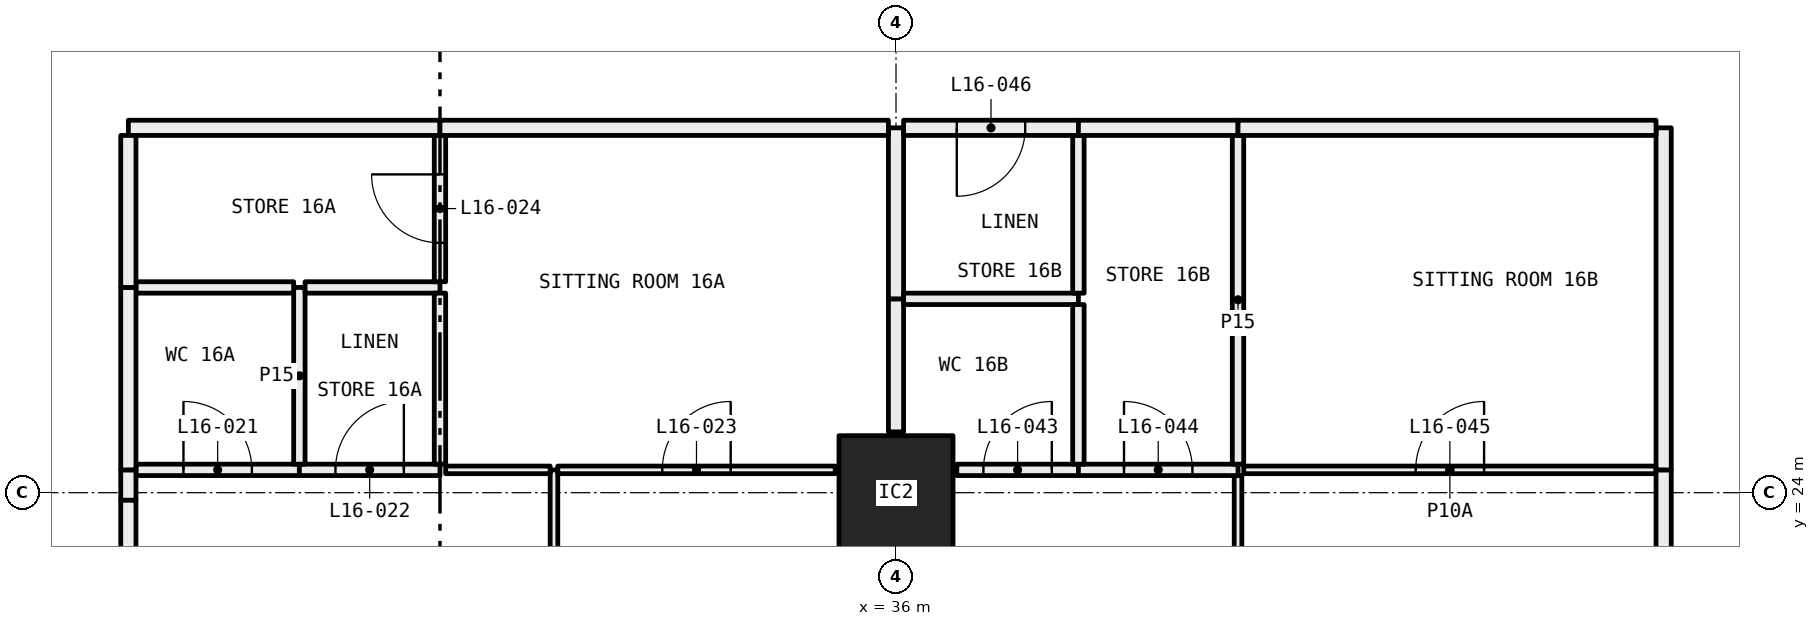
"""IFC4 building model, lengths in metres.
Left out: names, types, materials, properties, quantities, classifications, styles, units other than length and angle.
Written with IfcOpenShell. Run it as: python <this file> out.ifc"""

import sys

from ifc_helpers import new_model, si_unit, direction, frame, frame_2d, origin, origin_2d, place, context, subcontext, project, spatial, rectangle, hollow_rectangle, extrude, element, fill, save


model = new_model("IFC4")
c1 = context("Model", 3, precision=1e-05, world=origin(), true_north=direction((0.0, 1.0)))
c2 = subcontext(c1, "Body", "Model", "MODEL_VIEW")
j1 = project(units=[si_unit("LENGTHUNIT", "METRE"), si_unit("PLANEANGLEUNIT", "RADIAN")], contexts=[c1])
p1 = place(None, origin())
s1 = spatial("IfcSite", under=j1, at=p1, CompositionType="ELEMENT")
p2 = place(p1, origin())
s2 = spatial("IfcBuilding", under=s1, at=p2, CompositionType="ELEMENT")
p3 = place(p2, frame((0.0, 0.0, 67.95)))
s3 = spatial("IfcBuildingStorey", under=s2, at=p3, CompositionType="ELEMENT", Elevation=67.95)
p4 = place(p3, frame((36.0, 24.0, 0.0), z_axis=(0.0, 0.0, 1.0), x_axis=(1.0, 0.0, 0.0)))
e1 = element("IfcColumn", 1, at=p4, inside=s3, PredefinedType="COLUMN", context=c2, shape_type="SweptSolid", body=[
    extrude(hollow_rectangle(XDim=1.5, YDim=1.5, WallThickness=0.065, at=origin_2d()), origin(), (0.0, 0.0, 1.0), 3.05),
])
p5 = place(p3, frame((31.5, 18.05, 0.0), z_axis=(0.0, 0.0, 1.0), x_axis=(0.0, 1.0, 0.0)))
e2 = element("IfcWall", 2, at=p5, inside=s3, PredefinedType="PARTITIONING", context=c2, shape_type="SweptSolid", body=[
    extrude(rectangle(XDim=6.25, YDim=0.1, at=frame_2d((3.125, 0.0))), origin(), (0.0, 0.0, 1.0), 2.45),
])
p6 = place(p5, frame((2.675, 0.0, 0.0)))
e3 = element("IfcOpeningElement", 3, at=p6, cuts=e2, PredefinedType="OPENING", context=c2, shape_type="SweptSolid", body=[
    extrude(rectangle(XDim=0.9, YDim=2.1, at=frame_2d((0.45, 1.05))), frame((0.0, 0.06, 0.0), z_axis=(0.0, -1.0, 0.0), x_axis=(1.0, 0.0, 0.0)), (0.0, 0.0, 1.0), 0.12),
])
p7 = place(p3, frame((28.15, 24.3, 0.0), z_axis=(0.0, 0.0, 1.0), x_axis=(-1.0, 0.0, 0.0)))
e4 = element("IfcWall", 4, at=p7, inside=s3, PredefinedType="PARTITIONING", context=c2, shape_type="SweptSolid", body=[
    extrude(rectangle(XDim=2.15, YDim=0.15, at=frame_2d((1.075, 0.0))), origin(), (0.0, 0.0, 1.0), 3.05),
])
p8 = place(p7, frame((0.625, 0.0, 0.0)))
e5 = element("IfcOpeningElement", 5, at=p8, cuts=e4, PredefinedType="OPENING", context=c2, shape_type="SweptSolid", body=[
    extrude(rectangle(XDim=0.9, YDim=2.1, at=frame_2d((0.45, 1.05))), frame((0.0, 0.085, 0.0), z_axis=(0.0, -1.0, 0.0), x_axis=(1.0, 0.0, 0.0)), (0.0, 0.0, 1.0), 0.17),
])
p9 = place(p3, frame((30.0, 24.3, 0.0), z_axis=(0.0, 0.0, 1.0), x_axis=(-1.0, 0.0, 0.0)))
e6 = element("IfcWall", 6, at=p9, inside=s3, PredefinedType="PARTITIONING", context=c2, shape_type="SweptSolid", body=[
    extrude(rectangle(XDim=1.85, YDim=0.15, at=frame_2d((0.925, 0.0))), origin(), (0.0, 0.0, 1.0), 3.05),
])
p10 = place(p9, frame((0.475, 0.0, 0.0)))
e7 = element("IfcOpeningElement", 7, at=p10, cuts=e6, PredefinedType="OPENING", context=c2, shape_type="SweptSolid", body=[
    extrude(rectangle(XDim=0.9, YDim=2.1, at=frame_2d((0.45, 1.05))), frame((0.0, 0.085, 0.0), z_axis=(0.0, -1.0, 0.0), x_axis=(1.0, 0.0, 0.0)), (0.0, 0.0, 1.0), 0.17),
])
p11 = place(p3, frame((31.45, 24.3, 0.0), z_axis=(0.0, 0.0, 1.0), x_axis=(-1.0, 0.0, 0.0)))
e8 = element("IfcWall", 8, at=p11, inside=s3, PredefinedType="PARTITIONING", context=c2, shape_type="SweptSolid", body=[
    extrude(rectangle(XDim=1.375, YDim=0.1, at=frame_2d((0.688, 0.0))), origin(), (0.0, 0.0, 1.0), 3.05),
])
p12 = place(p3, frame((25.9, 24.3, 0.0), z_axis=(0.0, 0.0, 1.0), x_axis=(0.0, -1.0, 0.0)))
e9 = element("IfcWall", 9, at=p12, inside=s3, PredefinedType="PARTITIONING", context=c2, shape_type="SweptSolid", body=[
    extrude(rectangle(XDim=0.4, YDim=0.2, at=frame_2d((0.2, 0.0))), origin(), (0.0, 0.0, 1.0), 2.45),
])
p13 = place(p3, frame((25.9, 23.9, 0.0), z_axis=(0.0, 0.0, 1.0), x_axis=(0.0, -1.0, 0.0)))
e10 = element("IfcWall", 10, at=p13, inside=s3, PredefinedType="PARTITIONING", context=c2, shape_type="SweptSolid", body=[
    extrude(rectangle(XDim=5.8, YDim=0.2, at=frame_2d((2.9, 0.0))), origin(), (0.0, 0.0, 1.0), 3.05),
])
p14 = place(p3, frame((35.2, 24.3, 0.0), z_axis=(0.0, 0.0, 1.0), x_axis=(-1.0, 0.0, 0.0)))
e11 = element("IfcWall", 11, at=p14, inside=s3, PredefinedType="PARTITIONING", context=c2, shape_type="SweptSolid", body=[
    extrude(rectangle(XDim=3.65, YDim=0.1, at=frame_2d((1.825, 0.0))), origin(), (0.0, 0.0, 1.0), 3.05),
])
p15 = place(p14, frame((1.375, 0.0, 0.0)))
e12 = element("IfcOpeningElement", 12, at=p15, cuts=e11, PredefinedType="OPENING", context=c2, shape_type="SweptSolid", body=[
    extrude(rectangle(XDim=0.9, YDim=2.1, at=frame_2d((0.45, 1.05))), frame((0.0, 0.06, 0.0), z_axis=(0.0, -1.0, 0.0), x_axis=(1.0, 0.0, 0.0)), (0.0, 0.0, 1.0), 0.12),
])
p16 = place(p3, frame((28.15, 24.375, 0.0), z_axis=(0.0, 0.0, 1.0), x_axis=(0.0, 1.0, 0.0)))
e13 = element("IfcWall", 13, at=p16, inside=s3, PredefinedType="PARTITIONING", context=c2, shape_type="SweptSolid", body=[
    extrude(rectangle(XDim=2.325, YDim=0.15, at=frame_2d((1.163, 0.0))), origin(), (0.0, 0.0, 1.0), 3.05),
])
p17 = place(p3, frame((28.075, 26.7, 0.0), z_axis=(0.0, 0.0, 1.0), x_axis=(-1.0, 0.0, 0.0)))
e14 = element("IfcWall", 14, at=p17, inside=s3, PredefinedType="PARTITIONING", context=c2, shape_type="SweptSolid", body=[
    extrude(rectangle(XDim=2.075, YDim=0.15, at=frame_2d((1.038, 0.0))), origin(), (0.0, 0.0, 1.0), 3.05),
])
p18 = place(p3, frame((25.9, 26.7, 0.0), z_axis=(0.0, 0.0, 1.0), x_axis=(0.0, -1.0, 0.0)))
e15 = element("IfcWall", 15, at=p18, inside=s3, PredefinedType="PARTITIONING", context=c2, shape_type="SweptSolid", body=[
    extrude(rectangle(XDim=2.4, YDim=0.2, at=frame_2d((1.2, 0.0))), origin(), (0.0, 0.0, 1.0), 3.05),
])
p19 = place(p3, frame((30.0, 26.7, 0.0), z_axis=(0.0, 0.0, 1.0), x_axis=(-1.0, 0.0, 0.0)))
e16 = element("IfcWall", 16, at=p19, inside=s3, PredefinedType="PARTITIONING", context=c2, shape_type="SweptSolid", body=[
    extrude(rectangle(XDim=1.775, YDim=0.15, at=frame_2d((0.887, 0.0))), origin(), (0.0, 0.0, 1.0), 3.05),
])
p20 = place(p3, frame((30.0, 24.375, 0.0), z_axis=(0.0, 0.0, 1.0), x_axis=(0.0, 1.0, 0.0)))
e17 = element("IfcWall", 17, at=p20, inside=s3, PredefinedType="PARTITIONING", context=c2, shape_type="SweptSolid", body=[
    extrude(rectangle(XDim=2.25, YDim=0.15, at=frame_2d((1.125, 0.0))), origin(), (0.0, 0.0, 1.0), 3.05),
])
p21 = place(p3, frame((30.0, 26.775, 0.0), z_axis=(0.0, 0.0, 1.0), x_axis=(0.0, 1.0, 0.0)))
e18 = element("IfcWall", 18, at=p21, inside=s3, PredefinedType="PARTITIONING", context=c2, shape_type="SweptSolid", body=[
    extrude(rectangle(XDim=1.925, YDim=0.15, at=frame_2d((0.962, 0.0))), origin(), (0.0, 0.0, 1.0), 3.05),
])
p22 = place(p21, frame((0.512, 0.0, 0.0)))
e19 = element("IfcOpeningElement", 19, at=p22, cuts=e18, PredefinedType="OPENING", context=c2, shape_type="SweptSolid", body=[
    extrude(rectangle(XDim=0.9, YDim=2.1, at=frame_2d((0.45, 1.05))), frame((0.0, 0.085, 0.0), z_axis=(0.0, -1.0, 0.0), x_axis=(1.0, 0.0, 0.0)), (0.0, 0.0, 1.0), 0.17),
])
p23 = place(p3, frame((30.0, 28.8, 0.0), z_axis=(0.0, 0.0, 1.0), x_axis=(-1.0, 0.0, 0.0)))
e20 = element("IfcWall", 20, at=p23, inside=s3, PredefinedType="PARTITIONING", context=c2, shape_type="SweptSolid", body=[
    extrude(rectangle(XDim=4.1, YDim=0.2, at=frame_2d((2.05, 0.0))), origin(), (0.0, 0.0, 1.0), 3.05),
])
p24 = place(p3, frame((25.9, 28.7, 0.0), z_axis=(0.0, 0.0, 1.0), x_axis=(0.0, -1.0, 0.0)))
e21 = element("IfcWall", 21, at=p24, inside=s3, PredefinedType="PARTITIONING", context=c2, shape_type="SweptSolid", body=[
    extrude(rectangle(XDim=2.0, YDim=0.2, at=frame_2d((1.0, 0.0))), origin(), (0.0, 0.0, 1.0), 3.05),
])
p25 = place(p3, frame((36.0, 24.8, 0.0), z_axis=(0.0, 0.0, 1.0), x_axis=(0.0, 1.0, 0.0)))
e22 = element("IfcWall", 22, at=p25, inside=s3, PredefinedType="PARTITIONING", context=c2, shape_type="SweptSolid", body=[
    extrude(rectangle(XDim=1.75, YDim=0.2, at=frame_2d((0.875, 0.0))), origin(), (0.0, 0.0, 1.0), 2.45),
])
p26 = place(p3, frame((36.0, 26.55, 0.0), z_axis=(0.0, 0.0, 1.0), x_axis=(0.0, 1.0, 0.0)))
e23 = element("IfcWall", 23, at=p26, inside=s3, PredefinedType="PARTITIONING", context=c2, shape_type="SweptSolid", body=[
    extrude(rectangle(XDim=2.25, YDim=0.2, at=frame_2d((1.125, 0.0))), origin(), (0.0, 0.0, 1.0), 2.45),
])
p27 = place(p3, frame((35.9, 28.8, 0.0), z_axis=(0.0, 0.0, 1.0), x_axis=(-1.0, 0.0, 0.0)))
e24 = element("IfcWall", 24, at=p27, inside=s3, PredefinedType="PARTITIONING", context=c2, shape_type="SweptSolid", body=[
    extrude(rectangle(XDim=5.9, YDim=0.2, at=frame_2d((2.95, 0.0))), origin(), (0.0, 0.0, 1.0), 3.05),
])
p28 = place(p3, frame((40.5, 18.05, 0.0), z_axis=(0.0, 0.0, 1.0), x_axis=(0.0, 1.0, 0.0)))
e25 = element("IfcWall", 25, at=p28, inside=s3, PredefinedType="PARTITIONING", context=c2, shape_type="SweptSolid", body=[
    extrude(rectangle(XDim=6.175, YDim=0.1, at=frame_2d((3.087, 0.0))), origin(), (0.0, 0.0, 1.0), 2.45),
])
p29 = place(p28, frame((2.637, 0.0, 0.0)))
e26 = element("IfcOpeningElement", 26, at=p29, cuts=e25, PredefinedType="OPENING", context=c2, shape_type="SweptSolid", body=[
    extrude(rectangle(XDim=0.9, YDim=2.1, at=frame_2d((0.45, 1.05))), frame((0.0, 0.06, 0.0), z_axis=(0.0, -1.0, 0.0), x_axis=(1.0, 0.0, 0.0)), (0.0, 0.0, 1.0), 0.12),
])
p30 = place(p3, frame((38.4, 24.3, 0.0), z_axis=(0.0, 0.0, 1.0), x_axis=(-1.0, 0.0, 0.0)))
e27 = element("IfcWall", 27, at=p30, inside=s3, PredefinedType="PARTITIONING", context=c2, shape_type="SweptSolid", body=[
    extrude(rectangle(XDim=1.6, YDim=0.15, at=frame_2d((0.8, 0.0))), origin(), (0.0, 0.0, 1.0), 3.05),
])
p31 = place(p30, frame((0.35, 0.0, 0.0)))
e28 = element("IfcOpeningElement", 28, at=p31, cuts=e27, PredefinedType="OPENING", context=c2, shape_type="SweptSolid", body=[
    extrude(rectangle(XDim=0.9, YDim=2.1, at=frame_2d((0.45, 1.05))), frame((0.0, 0.085, 0.0), z_axis=(0.0, -1.0, 0.0), x_axis=(1.0, 0.0, 0.0)), (0.0, 0.0, 1.0), 0.17),
])
p32 = place(p3, frame((40.5, 24.3, 0.0), z_axis=(0.0, 0.0, 1.0), x_axis=(-1.0, 0.0, 0.0)))
e29 = element("IfcWall", 29, at=p32, inside=s3, PredefinedType="PARTITIONING", context=c2, shape_type="SweptSolid", body=[
    extrude(rectangle(XDim=2.1, YDim=0.15, at=frame_2d((1.05, 0.0))), origin(), (0.0, 0.0, 1.0), 3.05),
])
p33 = place(p32, frame((0.6, 0.0, 0.0)))
e30 = element("IfcOpeningElement", 30, at=p33, cuts=e29, PredefinedType="OPENING", context=c2, shape_type="SweptSolid", body=[
    extrude(rectangle(XDim=0.9, YDim=2.1, at=frame_2d((0.45, 1.05))), frame((0.0, 0.085, 0.0), z_axis=(0.0, -1.0, 0.0), x_axis=(1.0, 0.0, 0.0)), (0.0, 0.0, 1.0), 0.17),
])
p34 = place(p3, frame((46.0, 24.3, 0.0), z_axis=(0.0, 0.0, 1.0), x_axis=(-1.0, 0.0, 0.0)))
e31 = element("IfcWall", 31, at=p34, inside=s3, PredefinedType="PARTITIONING", context=c2, shape_type="SweptSolid", body=[
    extrude(rectangle(XDim=5.425, YDim=0.1, at=frame_2d((2.712, 0.0))), origin(), (0.0, 0.0, 1.0), 3.05),
])
p35 = place(p34, frame((2.262, 0.0, 0.0)))
e32 = element("IfcOpeningElement", 32, at=p35, cuts=e31, PredefinedType="OPENING", context=c2, shape_type="SweptSolid", body=[
    extrude(rectangle(XDim=0.9, YDim=2.1, at=frame_2d((0.45, 1.05))), frame((0.0, 0.06, 0.0), z_axis=(0.0, -1.0, 0.0), x_axis=(1.0, 0.0, 0.0)), (0.0, 0.0, 1.0), 0.12),
])
p36 = place(p3, frame((46.1, 18.1, 0.0), z_axis=(0.0, 0.0, 1.0), x_axis=(0.0, 1.0, 0.0)))
e33 = element("IfcWall", 33, at=p36, inside=s3, PredefinedType="PARTITIONING", context=c2, shape_type="SweptSolid", body=[
    extrude(rectangle(XDim=6.2, YDim=0.2, at=frame_2d((3.1, 0.0))), origin(), (0.0, 0.0, 1.0), 2.45),
])
p37 = place(p3, frame((38.4, 26.55, 0.0), z_axis=(0.0, 0.0, 1.0), x_axis=(-1.0, 0.0, 0.0)))
e34 = element("IfcWall", 34, at=p37, inside=s3, PredefinedType="PARTITIONING", context=c2, shape_type="SweptSolid", body=[
    extrude(rectangle(XDim=2.3, YDim=0.15, at=frame_2d((1.15, 0.0))), origin(), (0.0, 0.0, 1.0), 3.05),
])
p38 = place(p3, frame((38.4, 24.375, 0.0), z_axis=(0.0, 0.0, 1.0), x_axis=(0.0, 1.0, 0.0)))
e35 = element("IfcWall", 35, at=p38, inside=s3, PredefinedType="PARTITIONING", context=c2, shape_type="SweptSolid", body=[
    extrude(rectangle(XDim=2.1, YDim=0.15, at=frame_2d((1.05, 0.0))), origin(), (0.0, 0.0, 1.0), 3.05),
])
p39 = place(p3, frame((38.4, 26.625, 0.0), z_axis=(0.0, 0.0, 1.0), x_axis=(0.0, 1.0, 0.0)))
e36 = element("IfcWall", 36, at=p39, inside=s3, PredefinedType="PARTITIONING", context=c2, shape_type="SweptSolid", body=[
    extrude(rectangle(XDim=2.075, YDim=0.15, at=frame_2d((1.038, 0.0))), origin(), (0.0, 0.0, 1.0), 3.05),
])
p40 = place(p3, frame((38.4, 28.8, 0.0), z_axis=(0.0, 0.0, 1.0), x_axis=(-1.0, 0.0, 0.0)))
e37 = element("IfcWall", 37, at=p40, inside=s3, PredefinedType="PARTITIONING", context=c2, shape_type="SweptSolid", body=[
    extrude(rectangle(XDim=2.3, YDim=0.2, at=frame_2d((1.15, 0.0))), origin(), (0.0, 0.0, 1.0), 3.05),
])
p41 = place(p40, frame((0.7, 0.0, 0.0)))
e38 = element("IfcOpeningElement", 38, at=p41, cuts=e37, PredefinedType="OPENING", context=c2, shape_type="SweptSolid", body=[
    extrude(rectangle(XDim=0.9, YDim=2.1, at=frame_2d((0.45, 1.05))), frame((0.0, 0.11, 0.0), z_axis=(0.0, -1.0, 0.0), x_axis=(1.0, 0.0, 0.0)), (0.0, 0.0, 1.0), 0.22),
])
p42 = place(p3, frame((40.5, 24.375, 0.0), z_axis=(0.0, 0.0, 1.0), x_axis=(0.0, 1.0, 0.0)))
e39 = element("IfcWall", 39, at=p42, inside=s3, PredefinedType="PARTITIONING", context=c2, shape_type="SweptSolid", body=[
    extrude(rectangle(XDim=4.325, YDim=0.15, at=frame_2d((2.163, 0.0))), origin(), (0.0, 0.0, 1.0), 3.05),
])
p43 = place(p3, frame((40.5, 28.8, 0.0), z_axis=(0.0, 0.0, 1.0), x_axis=(-1.0, 0.0, 0.0)))
e40 = element("IfcWall", 40, at=p43, inside=s3, PredefinedType="PARTITIONING", context=c2, shape_type="SweptSolid", body=[
    extrude(rectangle(XDim=2.1, YDim=0.2, at=frame_2d((1.05, 0.0))), origin(), (0.0, 0.0, 1.0), 3.05),
])
p44 = place(p3, frame((46.1, 24.3, 0.0), z_axis=(0.0, 0.0, 1.0), x_axis=(0.0, 1.0, 0.0)))
e41 = element("IfcWall", 41, at=p44, inside=s3, PredefinedType="PARTITIONING", context=c2, shape_type="SweptSolid", body=[
    extrude(rectangle(XDim=4.5, YDim=0.2, at=frame_2d((2.25, 0.0))), origin(), (0.0, 0.0, 1.0), 3.05),
])
p45 = place(p3, frame((46.0, 28.8, 0.0), z_axis=(0.0, 0.0, 1.0), x_axis=(-1.0, 0.0, 0.0)))
e42 = element("IfcWall", 42, at=p45, inside=s3, PredefinedType="PARTITIONING", context=c2, shape_type="SweptSolid", body=[
    extrude(rectangle(XDim=5.5, YDim=0.2, at=frame_2d((2.75, 0.0))), origin(), (0.0, 0.0, 1.0), 3.05),
])
p46 = place(p8, frame((0.9, 0.0, 0.0), x_axis=(-1.0, 0.0, 0.0)))
e43 = element("IfcDoor", 43, at=p46, inside=s3, OperationType="SINGLE_SWING_RIGHT", PredefinedType="DOOR", context=c2, shape_type="SweptSolid", body=[
    extrude(rectangle(XDim=0.9, YDim=2.1, at=frame_2d((0.45, 1.05))), frame((0.0, 0.025, 0.0), z_axis=(0.0, -1.0, 0.0), x_axis=(1.0, 0.0, 0.0)), (0.0, 0.0, 1.0), 0.05),
])
fill(e5, e43)
p47 = place(p10, frame((0.9, 0.0, 0.0), x_axis=(-1.0, 0.0, 0.0)))
e44 = element("IfcDoor", 44, at=p47, inside=s3, OperationType="SINGLE_SWING_LEFT", PredefinedType="DOOR", context=c2, shape_type="SweptSolid", body=[
    extrude(rectangle(XDim=0.9, YDim=2.1, at=frame_2d((0.45, 1.05))), frame((0.0, 0.025, 0.0), z_axis=(0.0, -1.0, 0.0), x_axis=(1.0, 0.0, 0.0)), (0.0, 0.0, 1.0), 0.05),
])
fill(e7, e44)
p48 = place(p15, frame((0.9, 0.0, 0.0), x_axis=(-1.0, 0.0, 0.0)))
e45 = element("IfcDoor", 45, at=p48, inside=s3, OperationType="SINGLE_SWING_LEFT", PredefinedType="DOOR", context=c2, shape_type="SweptSolid", body=[
    extrude(rectangle(XDim=0.9, YDim=2.1, at=frame_2d((0.45, 1.05))), frame((0.0, 0.025, 0.0), z_axis=(0.0, -1.0, 0.0), x_axis=(1.0, 0.0, 0.0)), (0.0, 0.0, 1.0), 0.05),
])
fill(e12, e45)
p49 = place(p22, origin())
e46 = element("IfcDoor", 46, at=p49, inside=s3, OperationType="SINGLE_SWING_LEFT", PredefinedType="DOOR", context=c2, shape_type="SweptSolid", body=[
    extrude(rectangle(XDim=0.9, YDim=2.1, at=frame_2d((0.45, 1.05))), frame((0.0, 0.025, 0.0), z_axis=(0.0, -1.0, 0.0), x_axis=(1.0, 0.0, 0.0)), (0.0, 0.0, 1.0), 0.05),
])
fill(e19, e46)
p50 = place(p31, frame((0.9, 0.0, 0.0), x_axis=(-1.0, 0.0, 0.0)))
e47 = element("IfcDoor", 47, at=p50, inside=s3, OperationType="SINGLE_SWING_LEFT", PredefinedType="DOOR", context=c2, shape_type="SweptSolid", body=[
    extrude(rectangle(XDim=0.9, YDim=2.1, at=frame_2d((0.45, 1.05))), frame((0.0, 0.025, 0.0), z_axis=(0.0, -1.0, 0.0), x_axis=(1.0, 0.0, 0.0)), (0.0, 0.0, 1.0), 0.05),
])
fill(e28, e47)
p51 = place(p33, frame((0.9, 0.0, 0.0), x_axis=(-1.0, 0.0, 0.0)))
e48 = element("IfcDoor", 48, at=p51, inside=s3, OperationType="SINGLE_SWING_RIGHT", PredefinedType="DOOR", context=c2, shape_type="SweptSolid", body=[
    extrude(rectangle(XDim=0.9, YDim=2.1, at=frame_2d((0.45, 1.05))), frame((0.0, 0.025, 0.0), z_axis=(0.0, -1.0, 0.0), x_axis=(1.0, 0.0, 0.0)), (0.0, 0.0, 1.0), 0.05),
])
fill(e30, e48)
p52 = place(p35, frame((0.9, 0.0, 0.0), x_axis=(-1.0, 0.0, 0.0)))
e49 = element("IfcDoor", 49, at=p52, inside=s3, OperationType="SINGLE_SWING_LEFT", PredefinedType="DOOR", context=c2, shape_type="SweptSolid", body=[
    extrude(rectangle(XDim=0.9, YDim=2.1, at=frame_2d((0.45, 1.05))), frame((0.0, 0.025, 0.0), z_axis=(0.0, -1.0, 0.0), x_axis=(1.0, 0.0, 0.0)), (0.0, 0.0, 1.0), 0.05),
])
fill(e32, e49)
p53 = place(p41, origin())
e50 = element("IfcDoor", 50, at=p53, inside=s3, OperationType="SINGLE_SWING_LEFT", PredefinedType="DOOR", context=c2, shape_type="SweptSolid", body=[
    extrude(rectangle(XDim=0.9, YDim=2.1, at=frame_2d((0.45, 1.05))), frame((0.0, 0.025, 0.0), z_axis=(0.0, -1.0, 0.0), x_axis=(1.0, 0.0, 0.0)), (0.0, 0.0, 1.0), 0.05),
])
fill(e38, e50)
save(model, sys.argv[1])
